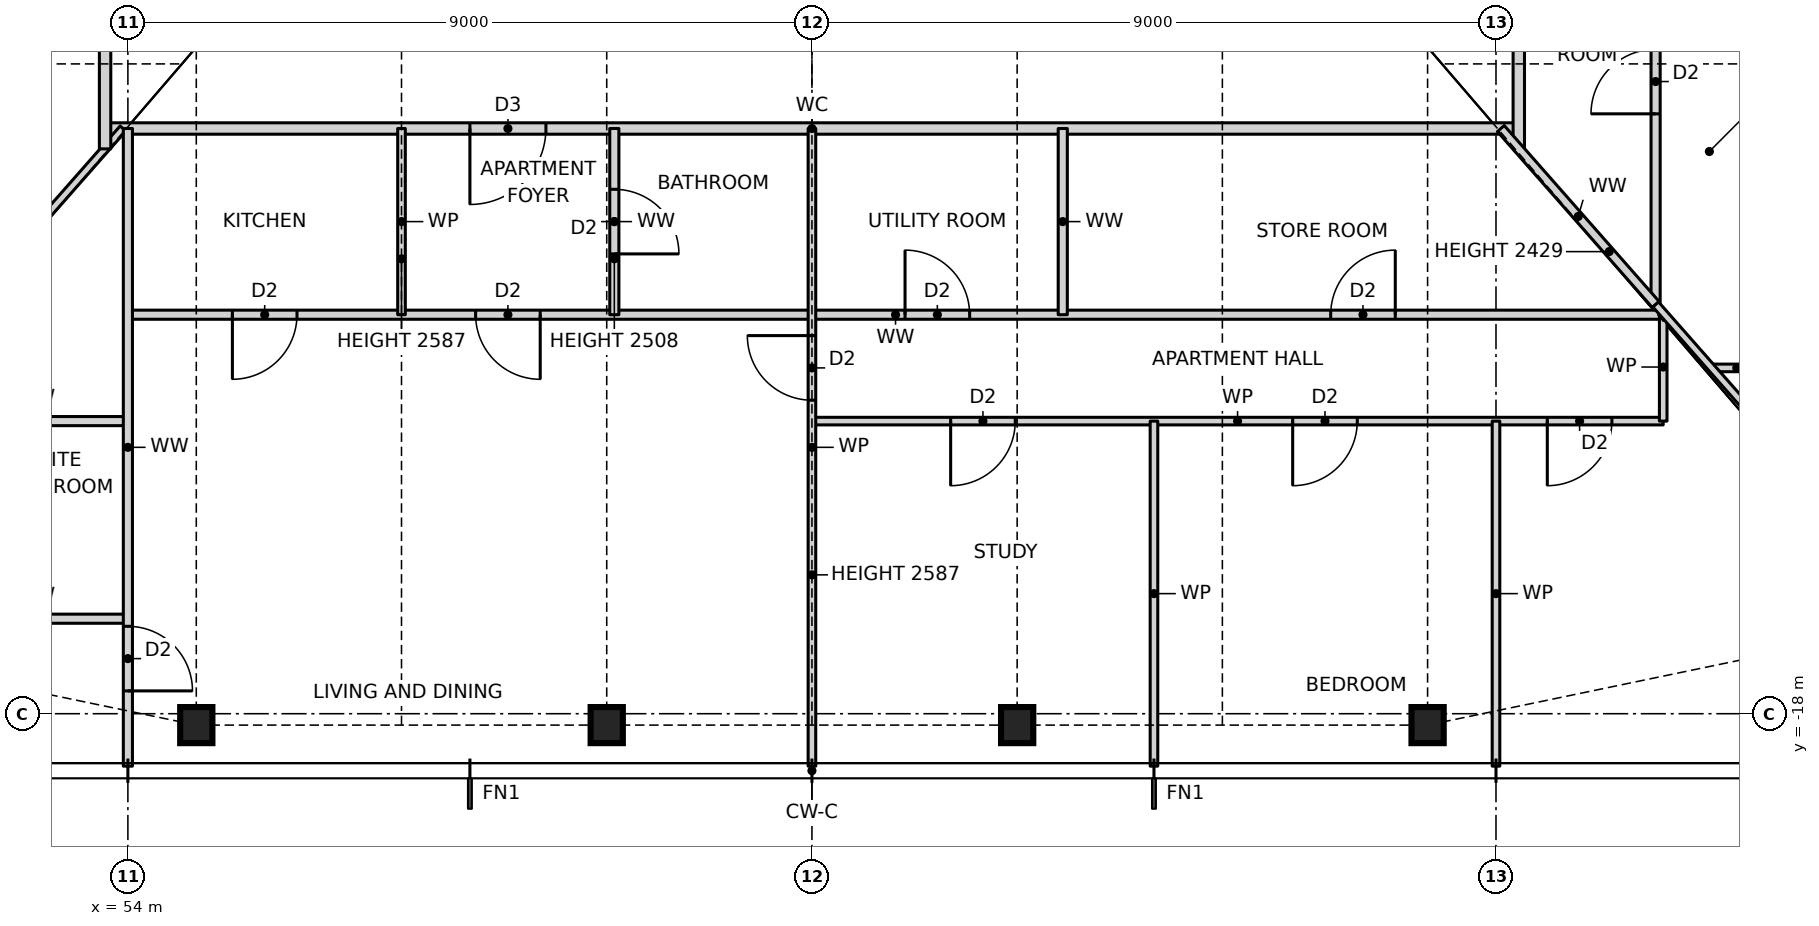
"""IFC4 building model, lengths in metres.
Left out: names, types, materials, properties, quantities, classifications, styles, units other than length and angle.
Written with IfcOpenShell. Run it as: python <this file> out.ifc"""

import sys

from ifc_helpers import new_model, si_unit, direction, frame, frame_2d, origin, origin_2d, place, context, subcontext, project, spatial, rectangle, i_section, extrude, element, fill, save


model = new_model("IFC4")
c1 = context("Model", 3, precision=1e-05, world=origin(), true_north=direction((0.0, 1.0)))
c2 = subcontext(c1, "Body", "Model", "MODEL_VIEW")
j1 = project(units=[si_unit("LENGTHUNIT", "METRE"), si_unit("PLANEANGLEUNIT", "RADIAN")], contexts=[c1])
p1 = place(None, origin())
s1 = spatial("IfcSite", under=j1, at=p1, CompositionType="ELEMENT")
p2 = place(p1, origin())
s2 = spatial("IfcBuilding", under=s1, at=p2, CompositionType="ELEMENT")
p3 = place(p2, frame((0.0, 0.0, 43.0)))
s3 = spatial("IfcBuildingStorey", under=s2, at=p3, CompositionType="ELEMENT", Elevation=43.0)
for number, where, z_axis, x_axis in (
    (1, (54.9, -18.15, 0.0), (0.0, 0.0, 1.0), (1.0, 0.0, 0.0)),
    (2, (60.3, -18.15, 0.0), (0.0, 0.0, 1.0), (1.0, 0.0, 0.0)),
    (3, (65.7, -18.15, 0.0), (0.0, 0.0, 1.0), (1.0, 0.0, 0.0)),
    (4, (71.1, -18.15, 0.0), (0.0, 0.0, 1.0), (1.0, 0.0, 0.0)),
):
    element("IfcColumn", number, at=place(p3, frame(where, z_axis=z_axis, x_axis=x_axis)), inside=s3, PredefinedType="COLUMN", context=c2, shape_type="SweptSolid", body=[
        extrude(i_section(OverallWidth=0.424, OverallDepth=0.475, WebThickness=0.048, FlangeThickness=0.077, at=origin_2d()), origin(), (0.0, 0.0, 1.0), 3.5),
    ])
for number, where, z_axis, x_axis in (
    (5, (51.6, -16.75, 0.0), (0.0, 0.0, 1.0), (1.0, 0.0, 0.0)),
    (6, (51.6, -14.15, 0.0), (0.0, 0.0, 1.0), (1.0, 0.0, 0.0)),
):
    element("IfcWall", number, at=place(p3, frame(where, z_axis=z_axis, x_axis=x_axis)), inside=s3, PredefinedType="PARTITIONING", context=c2, shape_type="SweptSolid", body=[
        extrude(rectangle(XDim=2.4, YDim=0.12, at=frame_2d((1.2, 0.0))), origin(), (0.0, 0.0, 1.0), 3.27),
    ])
p4 = place(p3, frame((63.0, -14.15, 0.0), z_axis=(0.0, 0.0, 1.0), x_axis=(1.0, 0.0, 0.0)))
e7 = element("IfcWall", 7, at=p4, inside=s3, PredefinedType="PARTITIONING", context=c2, shape_type="SweptSolid", body=[
    extrude(rectangle(XDim=11.2, YDim=0.1, at=frame_2d((5.6, 0.0))), origin(), (0.0, 0.0, 1.0), 3.27),
])
p5 = place(p4, frame((1.825, 0.0, 0.0)))
e8 = element("IfcOpeningElement", 8, at=p5, cuts=e7, PredefinedType="OPENING", context=c2, shape_type="SweptSolid", body=[
    extrude(rectangle(XDim=0.85, YDim=2.1, at=frame_2d((0.425, 1.05))), frame((0.0, 0.06, 0.0), z_axis=(0.0, -1.0, 0.0), x_axis=(1.0, 0.0, 0.0)), (0.0, 0.0, 1.0), 0.12),
])
p6 = place(p4, frame((6.325, 0.0, 0.0)))
e9 = element("IfcOpeningElement", 9, at=p6, cuts=e7, PredefinedType="OPENING", context=c2, shape_type="SweptSolid", body=[
    extrude(rectangle(XDim=0.85, YDim=2.1, at=frame_2d((0.425, 1.05))), frame((0.0, 0.06, 0.0), z_axis=(0.0, -1.0, 0.0), x_axis=(1.0, 0.0, 0.0)), (0.0, 0.0, 1.0), 0.12),
])
p7 = place(p4, frame((9.675, 0.0, 0.0)))
e10 = element("IfcOpeningElement", 10, at=p7, cuts=e7, PredefinedType="OPENING", context=c2, shape_type="SweptSolid", body=[
    extrude(rectangle(XDim=0.85, YDim=2.1, at=frame_2d((0.425, 1.05))), frame((0.0, 0.06, 0.0), z_axis=(0.0, -1.0, 0.0), x_axis=(1.0, 0.0, 0.0)), (0.0, 0.0, 1.0), 0.12),
])
p8 = place(p3, frame((74.836, -13.45, 0.0), z_axis=(0.0, 0.0, 1.0), x_axis=(1.0, 0.0, 0.0)))
e11 = element("IfcWall", 11, at=p8, inside=s3, PredefinedType="PARTITIONING", context=c2, shape_type="SweptSolid", body=[
    extrude(rectangle(XDim=0.664, YDim=0.1, at=frame_2d((0.332, 0.0))), origin(), (0.0, 0.0, 1.0), 3.27),
])
p9 = place(p3, frame((54.0, -12.75, 0.0), z_axis=(0.0, 0.0, 1.0), x_axis=(1.0, 0.0, 0.0)))
e12 = element("IfcWall", 12, at=p9, inside=s3, PredefinedType="PARTITIONING", context=c2, shape_type="SweptSolid", body=[
    extrude(rectangle(XDim=20.2, YDim=0.12, at=frame_2d((10.1, 0.0))), origin(), (0.0, 0.0, 1.0), 3.27),
])
p10 = place(p9, frame((1.375, 0.0, 0.0)))
e13 = element("IfcOpeningElement", 13, at=p10, cuts=e12, PredefinedType="OPENING", context=c2, shape_type="SweptSolid", body=[
    extrude(rectangle(XDim=0.85, YDim=2.1, at=frame_2d((0.425, 1.05))), frame((0.0, 0.07, 0.0), z_axis=(0.0, -1.0, 0.0), x_axis=(1.0, 0.0, 0.0)), (0.0, 0.0, 1.0), 0.14),
])
p11 = place(p9, frame((4.575, 0.0, 0.0)))
e14 = element("IfcOpeningElement", 14, at=p11, cuts=e12, PredefinedType="OPENING", context=c2, shape_type="SweptSolid", body=[
    extrude(rectangle(XDim=0.85, YDim=2.1, at=frame_2d((0.425, 1.05))), frame((0.0, 0.07, 0.0), z_axis=(0.0, -1.0, 0.0), x_axis=(1.0, 0.0, 0.0)), (0.0, 0.0, 1.0), 0.14),
])
p12 = place(p9, frame((10.225, 0.0, 0.0)))
e15 = element("IfcOpeningElement", 15, at=p12, cuts=e12, PredefinedType="OPENING", context=c2, shape_type="SweptSolid", body=[
    extrude(rectangle(XDim=0.85, YDim=2.1, at=frame_2d((0.425, 1.05))), frame((0.0, 0.07, 0.0), z_axis=(0.0, -1.0, 0.0), x_axis=(1.0, 0.0, 0.0)), (0.0, 0.0, 1.0), 0.14),
])
p13 = place(p9, frame((15.825, 0.0, 0.0)))
e16 = element("IfcOpeningElement", 16, at=p13, cuts=e12, PredefinedType="OPENING", context=c2, shape_type="SweptSolid", body=[
    extrude(rectangle(XDim=0.85, YDim=2.1, at=frame_2d((0.425, 1.05))), frame((0.0, 0.07, 0.0), z_axis=(0.0, -1.0, 0.0), x_axis=(1.0, 0.0, 0.0)), (0.0, 0.0, 1.0), 0.14),
])
p14 = place(p3, frame((53.7, -10.3, 0.0), z_axis=(0.0, 0.0, 1.0), x_axis=(1.0, 0.0, 0.0)))
e17 = element("IfcWall", 17, at=p14, inside=s3, PredefinedType="PARTITIONING", context=c2, shape_type="SweptSolid", body=[
    extrude(rectangle(XDim=18.6, YDim=0.15, at=frame_2d((9.3, 0.0))), origin(), (0.0, 0.0, 1.0), 3.27),
])
p15 = place(p14, frame((4.8, 0.0, 0.0)))
e18 = element("IfcOpeningElement", 18, at=p15, cuts=e17, PredefinedType="OPENING", context=c2, shape_type="SweptSolid", body=[
    extrude(rectangle(XDim=1.0, YDim=2.1, at=frame_2d((0.5, 1.05))), frame((0.0, 0.085, 0.0), z_axis=(0.0, -1.0, 0.0), x_axis=(1.0, 0.0, 0.0)), (0.0, 0.0, 1.0), 0.17),
])
p16 = place(p3, frame((47.944, -17.109, 0.0), z_axis=(0.0, 0.0, 1.0), x_axis=(0.660638210404, 0.750704439146, 0.0)))
e19 = element("IfcWall", 19, at=p16, inside=s3, PredefinedType="PARTITIONING", context=c2, shape_type="SweptSolid", body=[
    extrude(rectangle(XDim=9.07, YDim=0.1, at=frame_2d((4.535, 0.0))), origin(), (0.0, 0.0, 1.0), 2.429),
])
p17 = place(p3, frame((74.2, -14.15, 0.0), z_axis=(0.0, 0.0, 1.0), x_axis=(0.0, 1.0, 0.0)))
e20 = element("IfcWall", 20, at=p17, inside=s3, PredefinedType="PARTITIONING", context=c2, shape_type="SweptSolid", body=[
    extrude(rectangle(XDim=1.423, YDim=0.1, at=frame_2d((0.711, 0.0))), origin(), (0.0, 0.0, 1.0), 3.27),
])
p18 = place(p3, frame((74.1, -12.614, 0.0), z_axis=(0.0, 0.0, 1.0), x_axis=(0.0, 1.0, 0.0)))
e21 = element("IfcWall", 21, at=p18, inside=s3, PredefinedType="PARTITIONING", context=c2, shape_type="SweptSolid", body=[
    extrude(rectangle(XDim=25.228, YDim=0.12, at=frame_2d((12.614, 0.0))), origin(), (0.0, 0.0, 1.0), 3.27),
])
p19 = place(p18, frame((7.239, 0.0, 0.0)))
e22 = element("IfcOpeningElement", 22, at=p19, cuts=e21, PredefinedType="OPENING", context=c2, shape_type="SweptSolid", body=[
    extrude(rectangle(XDim=0.85, YDim=2.1, at=frame_2d((0.425, 1.05))), frame((0.0, 0.07, 0.0), z_axis=(0.0, -1.0, 0.0), x_axis=(1.0, 0.0, 0.0)), (0.0, 0.0, 1.0), 0.14),
])
p20 = place(p18, frame((10.439, 0.0, 0.0)))
e23 = element("IfcOpeningElement", 23, at=p20, cuts=e21, PredefinedType="OPENING", context=c2, shape_type="SweptSolid", body=[
    extrude(rectangle(XDim=0.85, YDim=2.1, at=frame_2d((0.425, 1.05))), frame((0.0, 0.07, 0.0), z_axis=(0.0, -1.0, 0.0), x_axis=(1.0, 0.0, 0.0)), (0.0, 0.0, 1.0), 0.14),
])
p21 = place(p18, frame((2.507, 0.0, 0.0)))
e24 = element("IfcOpeningElement", 24, at=p21, cuts=e21, PredefinedType="OPENING", context=c2, shape_type="SweptSolid", body=[
    extrude(rectangle(XDim=0.85, YDim=2.1, at=frame_2d((0.425, 1.05))), frame((0.0, 0.07, 0.0), z_axis=(0.0, -1.0, 0.0), x_axis=(1.0, 0.0, 0.0)), (0.0, 0.0, 1.0), 0.14),
])
p22 = place(p18, frame((16.639, 0.0, 0.0)))
e25 = element("IfcOpeningElement", 25, at=p22, cuts=e21, PredefinedType="OPENING", context=c2, shape_type="SweptSolid", body=[
    extrude(rectangle(XDim=0.85, YDim=2.1, at=frame_2d((0.425, 1.05))), frame((0.0, 0.07, 0.0), z_axis=(0.0, -1.0, 0.0), x_axis=(1.0, 0.0, 0.0)), (0.0, 0.0, 1.0), 0.14),
])
p23 = place(p18, frame((21.821, 0.0, 0.0)))
e26 = element("IfcOpeningElement", 26, at=p23, cuts=e21, PredefinedType="OPENING", context=c2, shape_type="SweptSolid", body=[
    extrude(rectangle(XDim=0.85, YDim=2.1, at=frame_2d((0.425, 1.05))), frame((0.0, 0.07, 0.0), z_axis=(0.0, -1.0, 0.0), x_axis=(1.0, 0.0, 0.0)), (0.0, 0.0, 1.0), 0.14),
])
p24 = place(p3, frame((72.3, -10.568, 0.0), z_axis=(0.0, 0.0, 1.0), x_axis=(0.0, 1.0, 0.0)))
e27 = element("IfcWall", 27, at=p24, inside=s3, PredefinedType="PARTITIONING", context=c2, shape_type="SweptSolid", body=[
    extrude(rectangle(XDim=21.468, YDim=0.15, at=frame_2d((10.734, 0.0))), origin(), (0.0, 0.0, 1.0), 3.27),
])
p25 = place(p24, frame((8.318, 0.0, 0.0)))
e28 = element("IfcOpeningElement", 28, at=p25, cuts=e27, PredefinedType="OPENING", context=c2, shape_type="SweptSolid", body=[
    extrude(rectangle(XDim=1.0, YDim=2.1, at=frame_2d((0.5, 1.05))), frame((0.0, 0.085, 0.0), z_axis=(0.0, -1.0, 0.0), x_axis=(1.0, 0.0, 0.0)), (0.0, 0.0, 1.0), 0.17),
])
for number, where, z_axis, x_axis in (
    (29, (72.0, -18.69, 0.0), (0.0, 0.0, 1.0), (0.0, 1.0, 0.0)),
    (30, (67.5, -18.69, 0.0), (0.0, 0.0, 1.0), (0.0, 1.0, 0.0)),
):
    element("IfcWall", number, at=place(p3, frame(where, z_axis=z_axis, x_axis=x_axis)), inside=s3, PredefinedType="PARTITIONING", context=c2, shape_type="SweptSolid", body=[
        extrude(rectangle(XDim=4.54, YDim=0.1, at=frame_2d((2.27, 0.0))), origin(), (0.0, 0.0, 1.0), 3.27),
    ])
p26 = place(p3, frame((66.3, -12.75, 0.0), z_axis=(0.0, 0.0, 1.0), x_axis=(0.0, 1.0, 0.0)))
e31 = element("IfcWall", 31, at=p26, inside=s3, PredefinedType="PARTITIONING", context=c2, shape_type="SweptSolid", body=[
    extrude(rectangle(XDim=2.45, YDim=0.12, at=frame_2d((1.225, 0.0))), origin(), (0.0, 0.0, 1.0), 3.27),
])
p27 = place(p3, frame((63.0, -18.69, 0.0), z_axis=(0.0, 0.0, 1.0), x_axis=(0.0, 1.0, 0.0)))
e32 = element("IfcWall", 32, at=p27, inside=s3, PredefinedType="PARTITIONING", context=c2, shape_type="SweptSolid", body=[
    extrude(rectangle(XDim=8.39, YDim=0.1, at=frame_2d((4.195, 0.0))), origin(), (0.0, 0.0, 1.0), 2.587),
])
p28 = place(p27, frame((4.815, 0.0, 0.0)))
e33 = element("IfcOpeningElement", 33, at=p28, cuts=e32, PredefinedType="OPENING", context=c2, shape_type="SweptSolid", body=[
    extrude(rectangle(XDim=0.85, YDim=2.1, at=frame_2d((0.425, 1.05))), frame((0.0, 0.06, 0.0), z_axis=(0.0, -1.0, 0.0), x_axis=(1.0, 0.0, 0.0)), (0.0, 0.0, 1.0), 0.12),
])
p29 = place(p3, frame((60.4, -12.75, 0.0), z_axis=(0.0, 0.0, 1.0), x_axis=(0.0, 1.0, 0.0)))
e34 = element("IfcWall", 34, at=p29, inside=s3, PredefinedType="PARTITIONING", context=c2, shape_type="SweptSolid", body=[
    extrude(rectangle(XDim=2.45, YDim=0.12, at=frame_2d((1.225, 0.0))), origin(), (0.0, 0.0, 1.0), 2.508),
])
p30 = place(p29, frame((0.8, 0.0, 0.0)))
e35 = element("IfcOpeningElement", 35, at=p30, cuts=e34, PredefinedType="OPENING", context=c2, shape_type="SweptSolid", body=[
    extrude(rectangle(XDim=0.85, YDim=2.1, at=frame_2d((0.425, 1.05))), frame((0.0, 0.07, 0.0), z_axis=(0.0, -1.0, 0.0), x_axis=(1.0, 0.0, 0.0)), (0.0, 0.0, 1.0), 0.14),
])
p31 = place(p3, frame((57.6, -12.75, 0.0), z_axis=(0.0, 0.0, 1.0), x_axis=(0.0, 1.0, 0.0)))
e36 = element("IfcWall", 36, at=p31, inside=s3, PredefinedType="PARTITIONING", context=c2, shape_type="SweptSolid", body=[
    extrude(rectangle(XDim=2.45, YDim=0.1, at=frame_2d((1.225, 0.0))), origin(), (0.0, 0.0, 1.0), 2.587),
])
p32 = place(p3, frame((54.0, -18.69, 0.0), z_axis=(0.0, 0.0, 1.0), x_axis=(0.0, 1.0, 0.0)))
e37 = element("IfcWall", 37, at=p32, inside=s3, PredefinedType="PARTITIONING", context=c2, shape_type="SweptSolid", body=[
    extrude(rectangle(XDim=8.39, YDim=0.12, at=frame_2d((4.195, 0.0))), origin(), (0.0, 0.0, 1.0), 3.27),
])
p33 = place(p32, frame((0.99, 0.0, 0.0)))
e38 = element("IfcOpeningElement", 38, at=p33, cuts=e37, PredefinedType="OPENING", context=c2, shape_type="SweptSolid", body=[
    extrude(rectangle(XDim=0.85, YDim=2.1, at=frame_2d((0.425, 1.05))), frame((0.0, 0.07, 0.0), z_axis=(0.0, -1.0, 0.0), x_axis=(1.0, 0.0, 0.0)), (0.0, 0.0, 1.0), 0.14),
])
p34 = place(p3, frame((53.7, -10.568, 0.0), z_axis=(0.0, 0.0, 1.0), x_axis=(0.0, 1.0, 0.0)))
e39 = element("IfcWall", 39, at=p34, inside=s3, PredefinedType="PARTITIONING", context=c2, shape_type="SweptSolid", body=[
    extrude(rectangle(XDim=21.468, YDim=0.15, at=frame_2d((10.734, 0.0))), origin(), (0.0, 0.0, 1.0), 3.27),
])
p35 = place(p34, frame((11.818, 0.0, 0.0)))
e40 = element("IfcOpeningElement", 40, at=p35, cuts=e39, PredefinedType="OPENING", context=c2, shape_type="SweptSolid", body=[
    extrude(rectangle(XDim=1.0, YDim=2.1, at=frame_2d((0.5, 1.05))), frame((0.0, 0.085, 0.0), z_axis=(0.0, -1.0, 0.0), x_axis=(1.0, 0.0, 0.0)), (0.0, 0.0, 1.0), 0.17),
])
p36 = place(p3, frame((78.057, -17.109, 0.0), z_axis=(0.0, 0.0, 1.0), x_axis=(-0.660775837956, 0.750583301156, 0.0)))
e41 = element("IfcWall", 41, at=p36, inside=s3, PredefinedType="PARTITIONING", context=c2, shape_type="SweptSolid", body=[
    extrude(rectangle(XDim=5.989, YDim=0.1, at=frame_2d((2.994, 0.0))), origin(), (0.0, 0.0, 1.0), 2.429),
])
p37 = place(p3, frame((74.1, -12.614, 0.0), z_axis=(0.0, 0.0, 1.0), x_axis=(-0.660767161141, 0.750590939699, 0.0)))
e42 = element("IfcWall", 42, at=p37, inside=s3, PredefinedType="PARTITIONING", context=c2, shape_type="SweptSolid", body=[
    extrude(rectangle(XDim=3.082, YDim=0.12, at=frame_2d((1.541, 0.0))), origin(), (0.0, 0.0, 1.0), 2.429),
])
p38 = place(p10, frame((0.85, 0.0, 0.0), z_axis=(0.0, 0.0, 1.0), x_axis=(-1.0, 0.0, 0.0)))
e43 = element("IfcDoor", 43, at=p38, inside=s3, OperationType="SINGLE_SWING_RIGHT", PredefinedType="DOOR", context=c2, shape_type="SweptSolid", body=[
    extrude(rectangle(XDim=0.85, YDim=2.1, at=frame_2d((0.425, 1.05))), frame((0.0, 0.025, 0.0), z_axis=(0.0, -1.0, 0.0), x_axis=(1.0, 0.0, 0.0)), (0.0, 0.0, 1.0), 0.05),
])
fill(e13, e43)
p39 = place(p15, frame((1.0, 0.0, 0.0), z_axis=(0.0, 0.0, 1.0), x_axis=(-1.0, 0.0, 0.0)))
e44 = element("IfcDoor", 44, at=p39, inside=s3, OperationType="SINGLE_SWING_RIGHT", PredefinedType="DOOR", context=c2, shape_type="SweptSolid", body=[
    extrude(rectangle(XDim=1.0, YDim=2.1, at=frame_2d((0.5, 1.05))), frame((0.0, 0.025, 0.0), z_axis=(0.0, -1.0, 0.0), x_axis=(1.0, 0.0, 0.0)), (0.0, 0.0, 1.0), 0.05),
])
fill(e18, e44)
p40 = place(p11, frame((0.85, 0.0, 0.0), z_axis=(0.0, 0.0, 1.0), x_axis=(-1.0, 0.0, 0.0)))
e45 = element("IfcDoor", 45, at=p40, inside=s3, OperationType="SINGLE_SWING_LEFT", PredefinedType="DOOR", context=c2, shape_type="SweptSolid", body=[
    extrude(rectangle(XDim=0.85, YDim=2.1, at=frame_2d((0.425, 1.05))), frame((0.0, 0.025, 0.0), z_axis=(0.0, -1.0, 0.0), x_axis=(1.0, 0.0, 0.0)), (0.0, 0.0, 1.0), 0.05),
])
fill(e14, e45)
p41 = place(p30, frame((0.85, 0.0, 0.0), z_axis=(0.0, 0.0, 1.0), x_axis=(-1.0, 0.0, 0.0)))
e46 = element("IfcDoor", 46, at=p41, inside=s3, OperationType="SINGLE_SWING_RIGHT", PredefinedType="DOOR", context=c2, shape_type="SweptSolid", body=[
    extrude(rectangle(XDim=0.85, YDim=2.1, at=frame_2d((0.425, 1.05))), frame((0.0, 0.025, 0.0), z_axis=(0.0, -1.0, 0.0), x_axis=(1.0, 0.0, 0.0)), (0.0, 0.0, 1.0), 0.05),
])
fill(e35, e46)
p42 = place(p33, frame((0.85, 0.0, 0.0), z_axis=(0.0, 0.0, 1.0), x_axis=(-1.0, 0.0, 0.0)))
e47 = element("IfcDoor", 47, at=p42, inside=s3, OperationType="SINGLE_SWING_RIGHT", PredefinedType="DOOR", context=c2, shape_type="SweptSolid", body=[
    extrude(rectangle(XDim=0.85, YDim=2.1, at=frame_2d((0.425, 1.05))), frame((0.0, 0.025, 0.0), z_axis=(0.0, -1.0, 0.0), x_axis=(1.0, 0.0, 0.0)), (0.0, 0.0, 1.0), 0.05),
])
fill(e38, e47)
p43 = place(p28, origin())
e48 = element("IfcDoor", 48, at=p43, inside=s3, OperationType="SINGLE_SWING_RIGHT", PredefinedType="DOOR", context=c2, shape_type="SweptSolid", body=[
    extrude(rectangle(XDim=0.85, YDim=2.1, at=frame_2d((0.425, 1.05))), frame((0.0, 0.025, 0.0), z_axis=(0.0, -1.0, 0.0), x_axis=(1.0, 0.0, 0.0)), (0.0, 0.0, 1.0), 0.05),
])
fill(e33, e48)
p44 = place(p5, frame((0.85, 0.0, 0.0), z_axis=(0.0, 0.0, 1.0), x_axis=(-1.0, 0.0, 0.0)))
e49 = element("IfcDoor", 49, at=p44, inside=s3, OperationType="SINGLE_SWING_RIGHT", PredefinedType="DOOR", context=c2, shape_type="SweptSolid", body=[
    extrude(rectangle(XDim=0.85, YDim=2.1, at=frame_2d((0.425, 1.05))), frame((0.0, 0.025, 0.0), z_axis=(0.0, -1.0, 0.0), x_axis=(1.0, 0.0, 0.0)), (0.0, 0.0, 1.0), 0.05),
])
fill(e8, e49)
p45 = place(p6, frame((0.85, 0.0, 0.0), z_axis=(0.0, 0.0, 1.0), x_axis=(-1.0, 0.0, 0.0)))
e50 = element("IfcDoor", 50, at=p45, inside=s3, OperationType="SINGLE_SWING_RIGHT", PredefinedType="DOOR", context=c2, shape_type="SweptSolid", body=[
    extrude(rectangle(XDim=0.85, YDim=2.1, at=frame_2d((0.425, 1.05))), frame((0.0, 0.025, 0.0), z_axis=(0.0, -1.0, 0.0), x_axis=(1.0, 0.0, 0.0)), (0.0, 0.0, 1.0), 0.05),
])
fill(e9, e50)
p46 = place(p7, frame((0.85, 0.0, 0.0), z_axis=(0.0, 0.0, 1.0), x_axis=(-1.0, 0.0, 0.0)))
e51 = element("IfcDoor", 51, at=p46, inside=s3, OperationType="SINGLE_SWING_RIGHT", PredefinedType="DOOR", context=c2, shape_type="SweptSolid", body=[
    extrude(rectangle(XDim=0.85, YDim=2.1, at=frame_2d((0.425, 1.05))), frame((0.0, 0.025, 0.0), z_axis=(0.0, -1.0, 0.0), x_axis=(1.0, 0.0, 0.0)), (0.0, 0.0, 1.0), 0.05),
])
fill(e10, e51)
p47 = place(p12, origin())
e52 = element("IfcDoor", 52, at=p47, inside=s3, OperationType="SINGLE_SWING_LEFT", PredefinedType="DOOR", context=c2, shape_type="SweptSolid", body=[
    extrude(rectangle(XDim=0.85, YDim=2.1, at=frame_2d((0.425, 1.05))), frame((0.0, 0.025, 0.0), z_axis=(0.0, -1.0, 0.0), x_axis=(1.0, 0.0, 0.0)), (0.0, 0.0, 1.0), 0.05),
])
fill(e15, e52)
p48 = place(p13, origin())
e53 = element("IfcDoor", 53, at=p48, inside=s3, OperationType="SINGLE_SWING_RIGHT", PredefinedType="DOOR", context=c2, shape_type="SweptSolid", body=[
    extrude(rectangle(XDim=0.85, YDim=2.1, at=frame_2d((0.425, 1.05))), frame((0.0, 0.025, 0.0), z_axis=(0.0, -1.0, 0.0), x_axis=(1.0, 0.0, 0.0)), (0.0, 0.0, 1.0), 0.05),
])
fill(e16, e53)
p49 = place(p21, origin())
e54 = element("IfcDoor", 54, at=p49, inside=s3, OperationType="SINGLE_SWING_LEFT", PredefinedType="DOOR", context=c2, shape_type="SweptSolid", body=[
    extrude(rectangle(XDim=0.85, YDim=2.1, at=frame_2d((0.425, 1.05))), frame((0.0, 0.025, 0.0), z_axis=(0.0, -1.0, 0.0), x_axis=(1.0, 0.0, 0.0)), (0.0, 0.0, 1.0), 0.05),
])
fill(e24, e54)
save(model, sys.argv[1])
